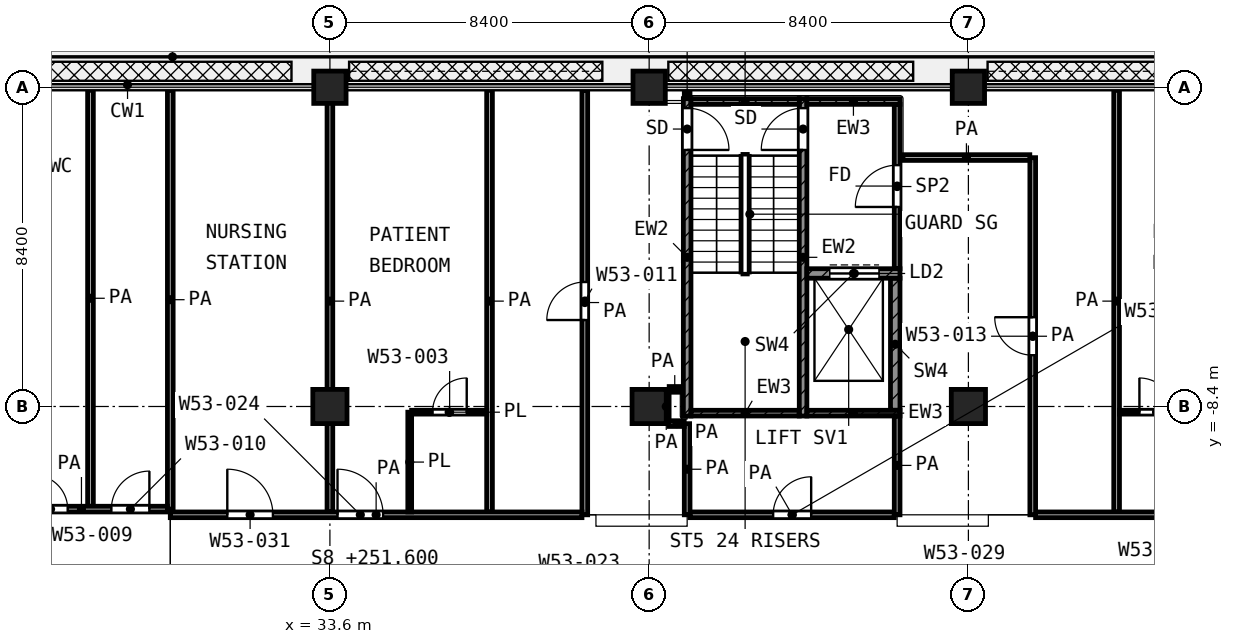
"""IFC4 building model, lengths in metres.
Left out: names, types, materials, properties, quantities, classifications, styles, units other than length and angle.
Written with IfcOpenShell. Run it as: python <this file> out.ifc"""

import sys

from ifc_helpers import new_model, si_unit, direction, frame, frame_2d, origin, origin_2d, place, context, subcontext, project, spatial, rectangle, extrude, element, fill, save


model = new_model("IFC4")
c1 = context("Model", 3, precision=1e-05, world=origin(), true_north=direction((0.0, 1.0)))
c2 = subcontext(c1, "Body", "Model", "MODEL_VIEW")
j1 = project(units=[si_unit("LENGTHUNIT", "METRE"), si_unit("PLANEANGLEUNIT", "RADIAN")], contexts=[c1])
p1 = place(None, origin())
s1 = spatial("IfcSite", under=j1, at=p1, CompositionType="ELEMENT")
p2 = place(p1, origin())
s2 = spatial("IfcBuilding", under=s1, at=p2, CompositionType="ELEMENT")
p3 = place(p2, frame((0.0, 0.0, 251.6)))
s3 = spatial("IfcBuildingStorey", under=s2, at=p3, CompositionType="ELEMENT", Elevation=251.6)
for number, where, z_axis, x_axis in (
    (1, (33.6, 0.0, 0.0), (0.0, 0.0, 1.0), (1.0, 0.0, 0.0)),
    (2, (42.0, 0.0, 0.0), (0.0, 0.0, 1.0), (1.0, 0.0, 0.0)),
    (3, (50.4, 0.0, 0.0), (0.0, 0.0, 1.0), (1.0, 0.0, 0.0)),
):
    element("IfcColumn", number, at=place(p3, frame(where, z_axis=z_axis, x_axis=x_axis)), inside=s3, PredefinedType="COLUMN", context=c2, shape_type="SweptSolid", body=[
        extrude(rectangle(XDim=0.85, YDim=0.85, at=origin_2d()), origin(), (0.0, 0.0, 1.0), 4.2),
    ])
for number, where, z_axis, x_axis in (
    (4, (33.6, -8.4, 0.0), (0.0, 0.0, 1.0), (1.0, 0.0, 0.0)),
    (5, (42.0, -8.4, 0.0), (0.0, 0.0, 1.0), (1.0, 0.0, 0.0)),
    (6, (50.4, -8.4, 0.0), (0.0, 0.0, 1.0), (1.0, 0.0, 0.0)),
):
    element("IfcColumn", number, at=place(p3, frame(where, z_axis=z_axis, x_axis=x_axis)), inside=s3, PredefinedType="COLUMN", context=c2, shape_type="SweptSolid", body=[
        extrude(rectangle(XDim=0.9, YDim=0.9, at=origin_2d()), origin(), (0.0, 0.0, 1.0), 4.2),
    ])
p4 = place(p3, frame((43.0, -8.65, 0.0), z_axis=(0.0, 0.0, 1.0), x_axis=(0.0, 1.0, 0.0)))
e7 = element("IfcWall", 7, at=p4, inside=s3, PredefinedType="SHEAR", context=c2, shape_type="SweptSolid", body=[
    extrude(rectangle(XDim=8.35, YDim=0.2, at=frame_2d((4.175, 0.0))), origin(), (0.0, 0.0, 1.0), 3.6),
])
p5 = place(p4, frame((7.0, 0.0, 0.0)))
e8 = element("IfcOpeningElement", 8, at=p5, cuts=e7, PredefinedType="OPENING", context=c2, shape_type="SweptSolid", body=[
    extrude(rectangle(XDim=1.1, YDim=2.1, at=frame_2d((0.55, 1.05))), frame((0.0, 0.11, 0.0), z_axis=(0.0, -1.0, 0.0), x_axis=(1.0, 0.0, 0.0)), (0.0, 0.0, 1.0), 0.22),
])
p6 = place(p3, frame((46.05, -8.65, 0.0), z_axis=(0.0, 0.0, 1.0), x_axis=(0.0, 1.0, 0.0)))
e9 = element("IfcWall", 9, at=p6, inside=s3, PredefinedType="SHEAR", context=c2, shape_type="SweptSolid", body=[
    extrude(rectangle(XDim=8.35, YDim=0.2, at=frame_2d((4.175, 0.0))), origin(), (0.0, 0.0, 1.0), 3.6),
])
p7 = place(p6, frame((7.0, 0.0, 0.0)))
e10 = element("IfcOpeningElement", 10, at=p7, cuts=e9, PredefinedType="OPENING", context=c2, shape_type="SweptSolid", body=[
    extrude(rectangle(XDim=1.1, YDim=2.1, at=frame_2d((0.55, 1.05))), frame((0.0, 0.11, 0.0), z_axis=(0.0, -1.0, 0.0), x_axis=(1.0, 0.0, 0.0)), (0.0, 0.0, 1.0), 0.22),
])
p8 = place(p3, frame((43.1, -0.375, 0.0), z_axis=(0.0, 0.0, 1.0), x_axis=(1.0, 0.0, 0.0)))
e11 = element("IfcWall", 11, at=p8, inside=s3, PredefinedType="SHEAR", context=c2, shape_type="SweptSolid", body=[
    extrude(rectangle(XDim=2.85, YDim=0.15, at=frame_2d((1.425, 0.0))), origin(), (0.0, 0.0, 1.0), 3.6),
])
p9 = place(p3, frame((46.15, -0.375, 0.0), z_axis=(0.0, 0.0, 1.0), x_axis=(1.0, 0.0, 0.0)))
e12 = element("IfcWall", 12, at=p9, inside=s3, PredefinedType="SHEAR", context=c2, shape_type="SweptSolid", body=[
    extrude(rectangle(XDim=2.45, YDim=0.15, at=frame_2d((1.225, 0.0))), origin(), (0.0, 0.0, 1.0), 3.6),
])
p10 = place(p3, frame((43.1, -8.575, 0.0), z_axis=(0.0, 0.0, 1.0), x_axis=(1.0, 0.0, 0.0)))
e13 = element("IfcWall", 13, at=p10, inside=s3, PredefinedType="SHEAR", context=c2, shape_type="SweptSolid", body=[
    extrude(rectangle(XDim=2.85, YDim=0.15, at=frame_2d((1.425, 0.0))), origin(), (0.0, 0.0, 1.0), 3.6),
])
p11 = place(p3, frame((46.15, -8.575, 0.0), z_axis=(0.0, 0.0, 1.0), x_axis=(1.0, 0.0, 0.0)))
e14 = element("IfcWall", 14, at=p11, inside=s3, PredefinedType="SHEAR", context=c2, shape_type="SweptSolid", body=[
    extrude(rectangle(XDim=2.45, YDim=0.15, at=frame_2d((1.225, 0.0))), origin(), (0.0, 0.0, 1.0), 3.6),
])
p12 = place(p3, frame((46.15, -4.9, 0.0), z_axis=(0.0, 0.0, 1.0), x_axis=(1.0, 0.0, 0.0)))
e15 = element("IfcWall", 15, at=p12, inside=s3, PredefinedType="SHEAR", context=c2, shape_type="SweptSolid", body=[
    extrude(rectangle(XDim=2.45, YDim=0.25, at=frame_2d((1.225, 0.0))), origin(), (0.0, 0.0, 1.0), 3.6),
])
p13 = place(p12, frame((0.6, 0.0, 0.0)))
e16 = element("IfcOpeningElement", 16, at=p13, cuts=e15, PredefinedType="OPENING", context=c2, shape_type="SweptSolid", body=[
    extrude(rectangle(XDim=1.3, YDim=2.1, at=frame_2d((0.65, 1.05))), frame((0.0, 0.135, 0.0), z_axis=(0.0, -1.0, 0.0), x_axis=(1.0, 0.0, 0.0)), (0.0, 0.0, 1.0), 0.27),
])
p14 = place(p3, frame((48.475, -8.5, 0.0), z_axis=(0.0, 0.0, 1.0), x_axis=(0.0, 1.0, 0.0)))
e17 = element("IfcWall", 17, at=p14, inside=s3, PredefinedType="SHEAR", context=c2, shape_type="SweptSolid", body=[
    extrude(rectangle(XDim=3.475, YDim=0.25, at=frame_2d((1.738, 0.0))), origin(), (0.0, 0.0, 1.0), 3.6),
])
p15 = place(p3, frame((48.525, -4.775, 0.0), z_axis=(0.0, 0.0, 1.0), x_axis=(0.0, 1.0, 0.0)))
e18 = element("IfcWall", 18, at=p15, inside=s3, PredefinedType="PARTITIONING", context=c2, shape_type="SweptSolid", body=[
    extrude(rectangle(XDim=4.325, YDim=0.15, at=frame_2d((2.163, 0.0))), origin(), (0.0, 0.0, 1.0), 3.6),
])
p16 = place(p15, frame((1.625, 0.0, 0.0)))
e19 = element("IfcOpeningElement", 19, at=p16, cuts=e18, PredefinedType="OPENING", context=c2, shape_type="SweptSolid", body=[
    extrude(rectangle(XDim=1.1, YDim=2.1, at=frame_2d((0.55, 1.05))), frame((0.0, 0.085, 0.0), z_axis=(0.0, -1.0, 0.0), x_axis=(1.0, 0.0, 0.0)), (0.0, 0.0, 1.0), 0.17),
])
p17 = place(p3, frame((35.75, -8.55, 0.0), z_axis=(0.0, 0.0, 1.0), x_axis=(1.0, 0.0, 0.0)))
e20 = element("IfcWall", 20, at=p17, inside=s3, PredefinedType="PARTITIONING", context=c2, shape_type="SweptSolid", body=[
    extrude(rectangle(XDim=1.975, YDim=0.1, at=frame_2d((0.988, 0.0))), origin(), (0.0, 0.0, 1.0), 3.6),
])
p18 = place(p17, frame((0.55, 0.0, 0.0)))
e21 = element("IfcOpeningElement", 21, at=p18, cuts=e20, PredefinedType="OPENING", context=c2, shape_type="SweptSolid", body=[
    extrude(rectangle(XDim=0.9, YDim=2.1, at=frame_2d((0.45, 1.05))), frame((0.0, 0.06, 0.0), z_axis=(0.0, -1.0, 0.0), x_axis=(1.0, 0.0, 0.0)), (0.0, 0.0, 1.0), 0.12),
])
p19 = place(p3, frame((54.375, -8.55, 0.0), z_axis=(0.0, 0.0, 1.0), x_axis=(1.0, 0.0, 0.0)))
e22 = element("IfcWall", 22, at=p19, inside=s3, PredefinedType="PARTITIONING", context=c2, shape_type="SweptSolid", body=[
    extrude(rectangle(XDim=1.975, YDim=0.1, at=frame_2d((0.988, 0.0))), origin(), (0.0, 0.0, 1.0), 3.6),
])
p20 = place(p19, frame((0.525, 0.0, 0.0)))
e23 = element("IfcOpeningElement", 23, at=p20, cuts=e22, PredefinedType="OPENING", context=c2, shape_type="SweptSolid", body=[
    extrude(rectangle(XDim=0.9, YDim=2.1, at=frame_2d((0.45, 1.05))), frame((0.0, 0.06, 0.0), z_axis=(0.0, -1.0, 0.0), x_axis=(1.0, 0.0, 0.0)), (0.0, 0.0, 1.0), 0.12),
])
p21 = place(p3, frame((35.7, -11.175, 0.0), z_axis=(0.0, 0.0, 1.0), x_axis=(0.0, 1.0, 0.0)))
e24 = element("IfcWall", 24, at=p21, inside=s3, PredefinedType="PARTITIONING", context=c2, shape_type="SweptSolid", body=[
    extrude(rectangle(XDim=2.625, YDim=0.1, at=frame_2d((1.312, 0.0))), origin(), (0.0, 0.0, 1.0), 3.6),
])
p22 = place(p3, frame((29.4, -11.25, 0.0), z_axis=(0.0, 0.0, 1.0), x_axis=(1.0, 0.0, 0.0)))
e25 = element("IfcWall", 25, at=p22, inside=s3, PredefinedType="PARTITIONING", context=c2, shape_type="SweptSolid", body=[
    extrude(rectangle(XDim=10.832, YDim=0.15, at=frame_2d((5.416, 0.0))), origin(), (0.0, 0.0, 1.0), 3.6),
])
p23 = place(p22, frame((4.4, 0.0, 0.0)))
e26 = element("IfcOpeningElement", 26, at=p23, cuts=e25, PredefinedType="OPENING", context=c2, shape_type="SweptSolid", body=[
    extrude(rectangle(XDim=1.2, YDim=2.1, at=frame_2d((0.6, 1.05))), frame((0.0, 0.085, 0.0), z_axis=(0.0, -1.0, 0.0), x_axis=(1.0, 0.0, 0.0)), (0.0, 0.0, 1.0), 0.17),
])
p24 = place(p22, frame((1.5, 0.0, 0.0)))
e27 = element("IfcOpeningElement", 27, at=p24, cuts=e25, PredefinedType="OPENING", context=c2, shape_type="SweptSolid", body=[
    extrude(rectangle(XDim=1.2, YDim=2.1, at=frame_2d((0.6, 1.05))), frame((0.0, 0.085, 0.0), z_axis=(0.0, -1.0, 0.0), x_axis=(1.0, 0.0, 0.0)), (0.0, 0.0, 1.0), 0.17),
])
p25 = place(p3, frame((43.075, -11.25, 0.0), z_axis=(0.0, 0.0, 1.0), x_axis=(1.0, 0.0, 0.0)))
e28 = element("IfcWall", 28, at=p25, inside=s3, PredefinedType="PARTITIONING", context=c2, shape_type="SweptSolid", body=[
    extrude(rectangle(XDim=5.375, YDim=0.15, at=frame_2d((2.688, 0.0))), origin(), (0.0, 0.0, 1.0), 3.6),
])
p26 = place(p25, frame((2.188, 0.0, 0.0)))
e29 = element("IfcOpeningElement", 29, at=p26, cuts=e28, PredefinedType="OPENING", context=c2, shape_type="SweptSolid", body=[
    extrude(rectangle(XDim=1.0, YDim=2.1, at=frame_2d((0.5, 1.05))), frame((0.0, 0.085, 0.0), z_axis=(0.0, -1.0, 0.0), x_axis=(1.0, 0.0, 0.0)), (0.0, 0.0, 1.0), 0.17),
])
p27 = place(p3, frame((52.168, -11.25, 0.0), z_axis=(0.0, 0.0, 1.0), x_axis=(1.0, 0.0, 0.0)))
e30 = element("IfcWall", 30, at=p27, inside=s3, PredefinedType="PARTITIONING", context=c2, shape_type="SweptSolid", body=[
    extrude(rectangle(XDim=10.752, YDim=0.15, at=frame_2d((5.376, 0.0))), origin(), (0.0, 0.0, 1.0), 2.7),
])
p28 = place(p27, frame((4.432, 0.0, 0.0)))
e31 = element("IfcOpeningElement", 31, at=p28, cuts=e30, PredefinedType="OPENING", context=c2, shape_type="SweptSolid", body=[
    extrude(rectangle(XDim=1.2, YDim=2.1, at=frame_2d((0.6, 1.05))), frame((0.0, 0.085, 0.0), z_axis=(0.0, -1.0, 0.0), x_axis=(1.0, 0.0, 0.0)), (0.0, 0.0, 1.0), 0.17),
])
p29 = place(p27, frame((8.232, 0.0, 0.0)))
e32 = element("IfcOpeningElement", 32, at=p29, cuts=e30, PredefinedType="OPENING", context=c2, shape_type="SweptSolid", body=[
    extrude(rectangle(XDim=1.0, YDim=2.1, at=frame_2d((0.5, 1.05))), frame((0.0, 0.085, 0.0), z_axis=(0.0, -1.0, 0.0), x_axis=(1.0, 0.0, 0.0)), (0.0, 0.0, 1.0), 0.17),
])
p30 = place(p3, frame((24.8, -11.1, 0.0), z_axis=(0.0, 0.0, 1.0), x_axis=(1.0, 0.0, 0.0)))
e33 = element("IfcWall", 33, at=p30, inside=s3, PredefinedType="PARTITIONING", context=c2, shape_type="SweptSolid", body=[
    extrude(rectangle(XDim=4.525, YDim=0.15, at=frame_2d((2.262, 0.0))), origin(), (0.0, 0.0, 1.0), 3.6),
])
p31 = place(p30, frame((1.0, 0.0, 0.0)))
e34 = element("IfcOpeningElement", 34, at=p31, cuts=e33, PredefinedType="OPENING", context=c2, shape_type="SweptSolid", body=[
    extrude(rectangle(XDim=0.9, YDim=2.1, at=frame_2d((0.45, 1.05))), frame((0.0, 0.085, 0.0), z_axis=(0.0, -1.0, 0.0), x_axis=(1.0, 0.0, 0.0)), (0.0, 0.0, 1.0), 0.17),
])
p32 = place(p30, frame((3.05, 0.0, 0.0)))
e35 = element("IfcOpeningElement", 35, at=p32, cuts=e33, PredefinedType="OPENING", context=c2, shape_type="SweptSolid", body=[
    extrude(rectangle(XDim=1.0, YDim=2.1, at=frame_2d((0.5, 1.05))), frame((0.0, 0.085, 0.0), z_axis=(0.0, -1.0, 0.0), x_axis=(1.0, 0.0, 0.0)), (0.0, 0.0, 1.0), 0.17),
])
p33 = place(p3, frame((42.527, -8.85, 0.0), z_axis=(0.0, 0.0, 1.0), x_axis=(1.0, 0.0, 0.0)))
e36 = element("IfcWall", 36, at=p33, inside=s3, PredefinedType="PARTITIONING", context=c2, shape_type="SweptSolid", body=[
    extrude(rectangle(XDim=0.396, YDim=0.15, at=frame_2d((0.198, 0.0))), origin(), (0.0, 0.0, 1.0), 3.6),
])
p34 = place(p3, frame((42.527, -7.95, 0.0), z_axis=(0.0, 0.0, 1.0), x_axis=(1.0, 0.0, 0.0)))
e37 = element("IfcWall", 37, at=p34, inside=s3, PredefinedType="PARTITIONING", context=c2, shape_type="SweptSolid", body=[
    extrude(rectangle(XDim=0.293, YDim=0.15, at=frame_2d((0.146, 0.0))), origin(), (0.0, 0.0, 1.0), 3.6),
])
p35 = place(p3, frame((48.68, -1.85, 0.0), z_axis=(0.0, 0.0, 1.0), x_axis=(1.0, 0.0, 0.0)))
e38 = element("IfcWall", 38, at=p35, inside=s3, PredefinedType="PARTITIONING", context=c2, shape_type="SweptSolid", body=[
    extrude(rectangle(XDim=3.336, YDim=0.15, at=frame_2d((1.668, 0.0))), origin(), (0.0, 0.0, 1.0), 3.6),
])
p36 = place(p3, frame((27.3, -11.025, 0.0), z_axis=(0.0, 0.0, 1.0), x_axis=(0.0, 1.0, 0.0)))
e39 = element("IfcWall", 39, at=p36, inside=s3, PredefinedType="PARTITIONING", context=c2, shape_type="SweptSolid", body=[
    extrude(rectangle(XDim=10.945, YDim=0.15, at=frame_2d((5.472, 0.0))), origin(), (0.0, 0.0, 1.0), 3.6),
])
p37 = place(p3, frame((29.4, -11.1, 0.0), z_axis=(0.0, 0.0, 1.0), x_axis=(0.0, 1.0, 0.0)))
e40 = element("IfcWall", 40, at=p37, inside=s3, PredefinedType="PARTITIONING", context=c2, shape_type="SweptSolid", body=[
    extrude(rectangle(XDim=11.02, YDim=0.15, at=frame_2d((5.51, 0.0))), origin(), (0.0, 0.0, 1.0), 3.6),
])
for number, where, z_axis, x_axis in (
    (41, (33.6, -11.175, 0.0), (0.0, 0.0, 1.0), (0.0, 1.0, 0.0)),
    (42, (37.8, -11.175, 0.0), (0.0, 0.0, 1.0), (0.0, 1.0, 0.0)),
):
    element("IfcWall", number, at=place(p3, frame(where, z_axis=z_axis, x_axis=x_axis)), inside=s3, PredefinedType="PARTITIONING", context=c2, shape_type="SweptSolid", body=[
        extrude(rectangle(XDim=11.095, YDim=0.15, at=frame_2d((5.547, 0.0))), origin(), (0.0, 0.0, 1.0), 3.6),
    ])
p38 = place(p3, frame((40.307, -11.25, 0.0), z_axis=(0.0, 0.0, 1.0), x_axis=(0.0, 1.0, 0.0)))
e43 = element("IfcWall", 43, at=p38, inside=s3, PredefinedType="PARTITIONING", context=c2, shape_type="SweptSolid", body=[
    extrude(rectangle(XDim=11.17, YDim=0.15, at=frame_2d((5.585, 0.0))), origin(), (0.0, 0.0, 1.0), 3.6),
])
p39 = place(p38, frame((5.125, 0.0, 0.0)))
e44 = element("IfcOpeningElement", 44, at=p39, cuts=e43, PredefinedType="OPENING", context=c2, shape_type="SweptSolid", body=[
    extrude(rectangle(XDim=1.0, YDim=2.1, at=frame_2d((0.5, 1.05))), frame((0.0, 0.085, 0.0), z_axis=(0.0, -1.0, 0.0), x_axis=(1.0, 0.0, 0.0)), (0.0, 0.0, 1.0), 0.17),
])
p40 = place(p3, frame((42.45, -8.849, 0.0), z_axis=(0.0, 0.0, 1.0), x_axis=(0.0, 1.0, 0.0)))
e45 = element("IfcWall", 45, at=p40, inside=s3, PredefinedType="PARTITIONING", context=c2, shape_type="SweptSolid", body=[
    extrude(rectangle(XDim=0.897, YDim=0.15, at=frame_2d((0.449, 0.0))), origin(), (0.0, 0.0, 1.0), 3.6),
])
p41 = place(p3, frame((43.0, -11.25, 0.0), z_axis=(0.0, 0.0, 1.0), x_axis=(0.0, 1.0, 0.0)))
e46 = element("IfcWall", 46, at=p41, inside=s3, PredefinedType="PARTITIONING", context=c2, shape_type="SweptSolid", body=[
    extrude(rectangle(XDim=2.398, YDim=0.15, at=frame_2d((1.199, 0.0))), origin(), (0.0, 0.0, 1.0), 3.6),
])
p42 = place(p3, frame((43.0, -0.27, 0.0), z_axis=(0.0, 0.0, 1.0), x_axis=(0.0, 1.0, 0.0)))
e47 = element("IfcWall", 47, at=p42, inside=s3, PredefinedType="PARTITIONING", context=c2, shape_type="SweptSolid", body=[
    extrude(rectangle(XDim=0.19, YDim=0.15, at=frame_2d((0.095, 0.0))), origin(), (0.0, 0.0, 1.0), 3.6),
])
p43 = place(p3, frame((48.525, -11.25, 0.0), z_axis=(0.0, 0.0, 1.0), x_axis=(0.0, 1.0, 0.0)))
e48 = element("IfcWall", 48, at=p43, inside=s3, PredefinedType="PARTITIONING", context=c2, shape_type="SweptSolid", body=[
    extrude(rectangle(XDim=2.6, YDim=0.15, at=frame_2d((1.3, 0.0))), origin(), (0.0, 0.0, 1.0), 3.6),
])
p44 = place(p3, frame((52.093, -11.25, 0.0), z_axis=(0.0, 0.0, 1.0), x_axis=(0.0, 1.0, 0.0)))
e49 = element("IfcWall", 49, at=p44, inside=s3, PredefinedType="PARTITIONING", context=c2, shape_type="SweptSolid", body=[
    extrude(rectangle(XDim=9.397, YDim=0.15, at=frame_2d((4.698, 0.0))), origin(), (0.0, 0.0, 1.0), 3.6),
])
p45 = place(p44, frame((4.199, 0.0, 0.0)))
e50 = element("IfcOpeningElement", 50, at=p45, cuts=e49, PredefinedType="OPENING", context=c2, shape_type="SweptSolid", body=[
    extrude(rectangle(XDim=1.0, YDim=2.1, at=frame_2d((0.5, 1.05))), frame((0.0, 0.085, 0.0), z_axis=(0.0, -1.0, 0.0), x_axis=(1.0, 0.0, 0.0)), (0.0, 0.0, 1.0), 0.17),
])
p46 = place(p3, frame((54.3, -11.175, 0.0), z_axis=(0.0, 0.0, 1.0), x_axis=(0.0, 1.0, 0.0)))
e51 = element("IfcWall", 51, at=p46, inside=s3, PredefinedType="PARTITIONING", context=c2, shape_type="SweptSolid", body=[
    extrude(rectangle(XDim=11.095, YDim=0.15, at=frame_2d((5.547, 0.0))), origin(), (0.0, 0.0, 1.0), 3.6),
])
p47 = place(p5, frame((1.1, 0.0, 0.0), z_axis=(0.0, 0.0, 1.0), x_axis=(-1.0, 0.0, 0.0)))
e52 = element("IfcDoor", 52, at=p47, inside=s3, OperationType="SINGLE_SWING_LEFT", PredefinedType="DOOR", context=c2, shape_type="SweptSolid", body=[
    extrude(rectangle(XDim=1.1, YDim=2.1, at=frame_2d((0.55, 1.05))), frame((0.0, 0.025, 0.0), z_axis=(0.0, -1.0, 0.0), x_axis=(1.0, 0.0, 0.0)), (0.0, 0.0, 1.0), 0.05),
])
fill(e8, e52)
p48 = place(p7, origin())
e53 = element("IfcDoor", 53, at=p48, inside=s3, OperationType="SINGLE_SWING_LEFT", PredefinedType="DOOR", context=c2, shape_type="SweptSolid", body=[
    extrude(rectangle(XDim=1.1, YDim=2.1, at=frame_2d((0.55, 1.05))), frame((0.0, 0.025, 0.0), z_axis=(0.0, -1.0, 0.0), x_axis=(1.0, 0.0, 0.0)), (0.0, 0.0, 1.0), 0.05),
])
fill(e10, e53)
p49 = place(p13, origin())
e54 = element("IfcDoor", 54, at=p49, inside=s3, OperationType="DOUBLE_DOOR_SLIDING", PredefinedType="DOOR", context=c2, shape_type="SweptSolid", body=[
    extrude(rectangle(XDim=1.3, YDim=2.1, at=frame_2d((0.65, 1.05))), frame((0.0, 0.025, 0.0), z_axis=(0.0, -1.0, 0.0), x_axis=(1.0, 0.0, 0.0)), (0.0, 0.0, 1.0), 0.05),
])
fill(e16, e54)
p50 = place(p16, origin())
e55 = element("IfcDoor", 55, at=p50, inside=s3, OperationType="SINGLE_SWING_LEFT", PredefinedType="DOOR", context=c2, shape_type="SweptSolid", body=[
    extrude(rectangle(XDim=1.1, YDim=2.1, at=frame_2d((0.55, 1.05))), frame((0.0, 0.025, 0.0), z_axis=(0.0, -1.0, 0.0), x_axis=(1.0, 0.0, 0.0)), (0.0, 0.0, 1.0), 0.05),
])
fill(e19, e55)
p51 = place(p23, origin())
e56 = element("IfcDoor", 56, at=p51, inside=s3, OperationType="SINGLE_SWING_LEFT", PredefinedType="DOOR", context=c2, shape_type="SweptSolid", body=[
    extrude(rectangle(XDim=1.2, YDim=2.1, at=frame_2d((0.6, 1.05))), frame((0.0, 0.025, 0.0), z_axis=(0.0, -1.0, 0.0), x_axis=(1.0, 0.0, 0.0)), (0.0, 0.0, 1.0), 0.05),
])
fill(e26, e56)
p52 = place(p18, origin())
e57 = element("IfcDoor", 57, at=p52, inside=s3, OperationType="SINGLE_SWING_RIGHT", PredefinedType="DOOR", context=c2, shape_type="SweptSolid", body=[
    extrude(rectangle(XDim=0.9, YDim=2.1, at=frame_2d((0.45, 1.05))), frame((0.0, 0.025, 0.0), z_axis=(0.0, -1.0, 0.0), x_axis=(1.0, 0.0, 0.0)), (0.0, 0.0, 1.0), 0.05),
])
fill(e21, e57)
p53 = place(p39, origin())
e58 = element("IfcDoor", 58, at=p53, inside=s3, OperationType="SINGLE_SWING_LEFT", PredefinedType="DOOR", context=c2, shape_type="SweptSolid", body=[
    extrude(rectangle(XDim=1.0, YDim=2.1, at=frame_2d((0.5, 1.05))), frame((0.0, 0.025, 0.0), z_axis=(0.0, -1.0, 0.0), x_axis=(1.0, 0.0, 0.0)), (0.0, 0.0, 1.0), 0.05),
])
fill(e44, e58)
p54 = place(p26, origin())
e59 = element("IfcDoor", 59, at=p54, inside=s3, OperationType="SINGLE_SWING_RIGHT", PredefinedType="DOOR", context=c2, shape_type="SweptSolid", body=[
    extrude(rectangle(XDim=1.0, YDim=2.1, at=frame_2d((0.5, 1.05))), frame((0.0, 0.025, 0.0), z_axis=(0.0, -1.0, 0.0), x_axis=(1.0, 0.0, 0.0)), (0.0, 0.0, 1.0), 0.05),
])
fill(e29, e59)
p55 = place(p45, origin())
e60 = element("IfcDoor", 60, at=p55, inside=s3, OperationType="SINGLE_SWING_RIGHT", PredefinedType="DOOR", context=c2, shape_type="SweptSolid", body=[
    extrude(rectangle(XDim=1.0, YDim=2.1, at=frame_2d((0.5, 1.05))), frame((0.0, 0.025, 0.0), z_axis=(0.0, -1.0, 0.0), x_axis=(1.0, 0.0, 0.0)), (0.0, 0.0, 1.0), 0.05),
])
fill(e50, e60)
p56 = place(p20, origin())
e61 = element("IfcDoor", 61, at=p56, inside=s3, OperationType="SINGLE_SWING_LEFT", PredefinedType="DOOR", context=c2, shape_type="SweptSolid", body=[
    extrude(rectangle(XDim=0.9, YDim=2.1, at=frame_2d((0.45, 1.05))), frame((0.0, 0.025, 0.0), z_axis=(0.0, -1.0, 0.0), x_axis=(1.0, 0.0, 0.0)), (0.0, 0.0, 1.0), 0.05),
])
fill(e23, e61)
p57 = place(p31, origin())
e62 = element("IfcDoor", 62, at=p57, inside=s3, OperationType="SINGLE_SWING_LEFT", PredefinedType="DOOR", context=c2, shape_type="SweptSolid", body=[
    extrude(rectangle(XDim=0.9, YDim=2.1, at=frame_2d((0.45, 1.05))), frame((0.0, 0.025, 0.0), z_axis=(0.0, -1.0, 0.0), x_axis=(1.0, 0.0, 0.0)), (0.0, 0.0, 1.0), 0.05),
])
fill(e34, e62)
p58 = place(p32, origin())
e63 = element("IfcDoor", 63, at=p58, inside=s3, OperationType="SINGLE_SWING_RIGHT", PredefinedType="DOOR", context=c2, shape_type="SweptSolid", body=[
    extrude(rectangle(XDim=1.0, YDim=2.1, at=frame_2d((0.5, 1.05))), frame((0.0, 0.025, 0.0), z_axis=(0.0, -1.0, 0.0), x_axis=(1.0, 0.0, 0.0)), (0.0, 0.0, 1.0), 0.05),
])
fill(e35, e63)
p59 = place(p24, origin())
e64 = element("IfcDoor", 64, at=p59, inside=s3, OperationType="SINGLE_SWING_LEFT", PredefinedType="DOOR", context=c2, shape_type="SweptSolid", body=[
    extrude(rectangle(XDim=1.2, YDim=2.1, at=frame_2d((0.6, 1.05))), frame((0.0, 0.025, 0.0), z_axis=(0.0, -1.0, 0.0), x_axis=(1.0, 0.0, 0.0)), (0.0, 0.0, 1.0), 0.05),
])
fill(e27, e64)
save(model, sys.argv[1])
